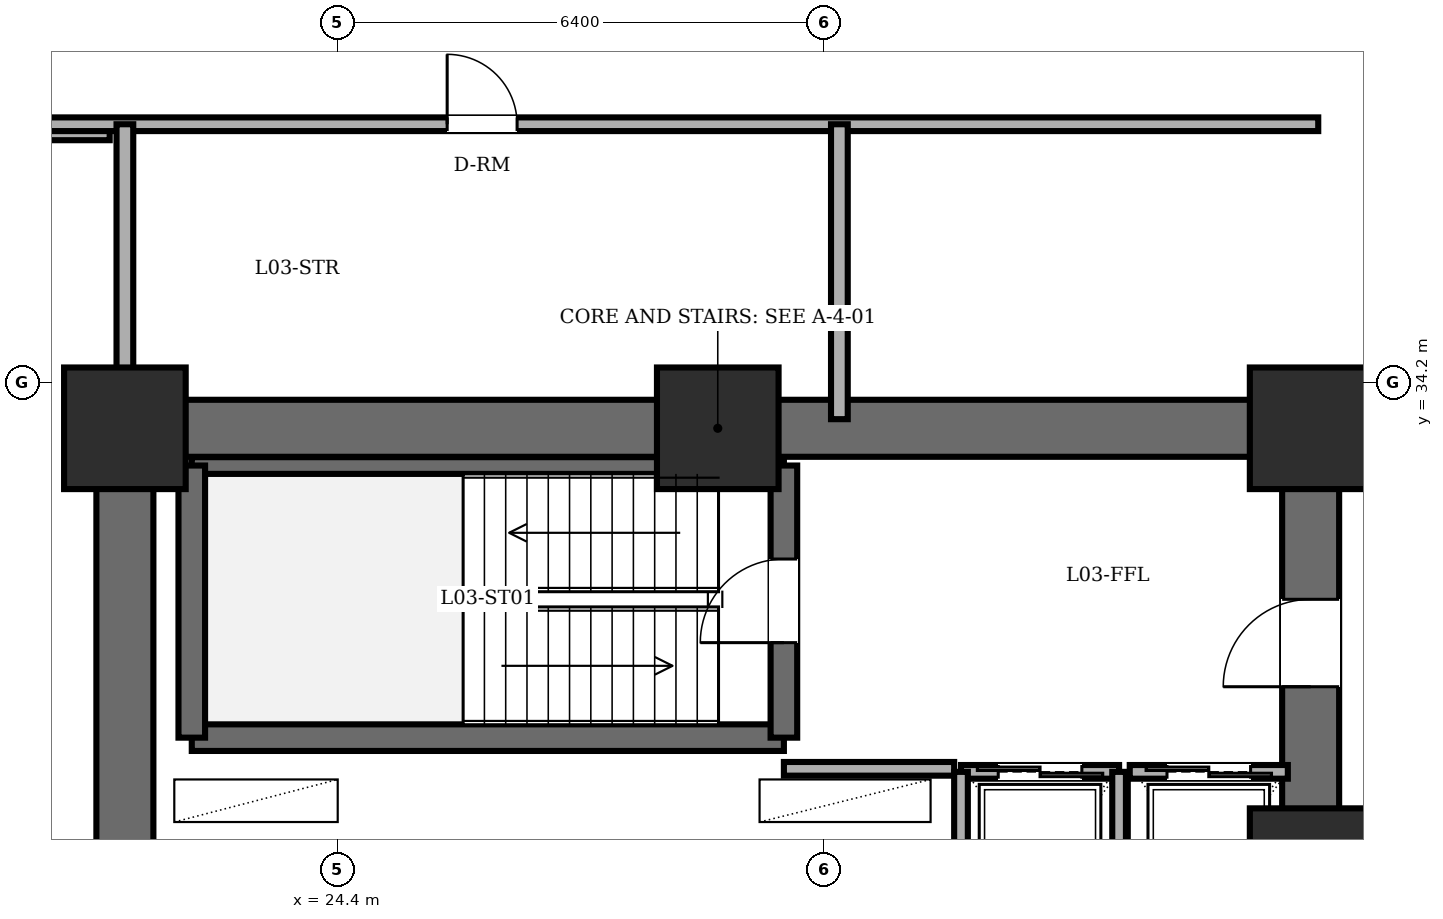
"""IFC4 building model, lengths in metres.
Left out: names, types, materials, properties, quantities, classifications, styles, units other than length and angle.
Written with IfcOpenShell. Run it as: python <this file> out.ifc"""

import sys

from ifc_helpers import new_model, si_unit, direction, frame, frame_2d, origin, origin_2d, place, context, subcontext, project, spatial, rectangle, extrude, element, fill, save


model = new_model("IFC4")
c1 = context("Model", 3, precision=1e-05, world=origin(), true_north=direction((0.0, 1.0)))
c2 = subcontext(c1, "Body", "Model", "MODEL_VIEW")
j1 = project(units=[si_unit("LENGTHUNIT", "METRE"), si_unit("PLANEANGLEUNIT", "RADIAN")], contexts=[c1])
p1 = place(None, origin())
s1 = spatial("IfcSite", under=j1, at=p1, CompositionType="ELEMENT")
p2 = place(p1, origin())
s2 = spatial("IfcBuilding", under=s1, at=p2, CompositionType="ELEMENT")
p3 = place(p2, frame((0.0, 0.0, 10.05)))
s3 = spatial("IfcBuildingStorey", under=s2, at=p3, CompositionType="ELEMENT", Elevation=10.05)
for number, where, z_axis, x_axis in (
    (1, (37.2, 27.8, 0.0), (0.0, 0.0, 1.0), (1.0, 0.0, 0.0)),
    (2, (37.2, 33.6, 0.0), (0.0, 0.0, 1.0), (1.0, 0.0, 0.0)),
    (3, (29.4, 33.6, 0.0), (0.0, 0.0, 1.0), (1.0, 0.0, 0.0)),
    (4, (21.6, 33.6, 0.0), (0.0, 0.0, 1.0), (1.0, 0.0, 0.0)),
):
    element("IfcColumn", number, at=place(p3, frame(where, z_axis=z_axis, x_axis=x_axis)), inside=s3, PredefinedType="COLUMN", context=c2, shape_type="SweptSolid", body=[
        extrude(rectangle(XDim=1.6, YDim=1.6, at=origin_2d()), origin(), (0.0, 0.0, 1.0), 4.65),
    ])
p4 = place(p3, frame((21.6, 14.4, 0.0), z_axis=(0.0, 0.0, 1.0), x_axis=(0.0, 1.0, 0.0)))
e5 = element("IfcWall", 5, at=p4, inside=s3, PredefinedType="SHEAR", context=c2, shape_type="SweptSolid", body=[
    extrude(rectangle(XDim=19.2, YDim=0.75, at=frame_2d((9.6, 0.0))), origin(), (0.0, 0.0, 1.0), 4.43),
])
p5 = place(p3, frame((21.6, 33.6, 0.0), z_axis=(0.0, 0.0, 1.0), x_axis=(1.0, 0.0, 0.0)))
e6 = element("IfcWall", 6, at=p5, inside=s3, PredefinedType="SHEAR", context=c2, shape_type="SweptSolid", body=[
    extrude(rectangle(XDim=15.6, YDim=0.75, at=frame_2d((7.8, 0.0))), origin(), (0.0, 0.0, 1.0), 4.43),
])
p6 = place(p3, frame((37.2, 14.4, 0.0), z_axis=(0.0, 0.0, 1.0), x_axis=(0.0, 1.0, 0.0)))
e7 = element("IfcWall", 7, at=p6, inside=s3, PredefinedType="SHEAR", context=c2, shape_type="SweptSolid", body=[
    extrude(rectangle(XDim=19.2, YDim=0.75, at=frame_2d((9.6, 0.0))), origin(), (0.0, 0.0, 1.0), 4.43),
])
p7 = place(p6, frame((15.8, 0.0, 0.0)))
e8 = element("IfcOpeningElement", 8, at=p7, cuts=e7, PredefinedType="OPENING", context=c2, shape_type="SweptSolid", body=[
    extrude(rectangle(XDim=1.15, YDim=2.15, at=frame_2d((0.575, 1.075))), frame((0.0, 0.385, 0.0), z_axis=(0.0, -1.0, 0.0), x_axis=(1.0, 0.0, 0.0)), (0.0, 0.0, 1.0), 0.77),
])
p8 = place(p6, frame((3.6, 0.0, 0.0)))
e9 = element("IfcOpeningElement", 9, at=p8, cuts=e7, PredefinedType="OPENING", context=c2, shape_type="SweptSolid", body=[
    extrude(rectangle(XDim=1.1, YDim=2.15, at=frame_2d((0.55, 1.075))), frame((0.0, 0.385, 0.0), z_axis=(0.0, -1.0, 0.0), x_axis=(1.0, 0.0, 0.0)), (0.0, 0.0, 1.0), 0.77),
])
p9 = place(p6, frame((8.6, 0.0, 0.0)))
e10 = element("IfcOpeningElement", 10, at=p9, cuts=e7, PredefinedType="OPENING", context=c2, shape_type="SweptSolid", body=[
    extrude(rectangle(XDim=1.3, YDim=2.2, at=frame_2d((0.65, 1.1))), frame((0.0, 0.385, 0.0), z_axis=(0.0, -1.0, 0.0), x_axis=(1.0, 0.0, 0.0)), (0.0, 0.0, 1.0), 0.77),
])
p10 = place(p3, frame((22.48, 29.53, 0.0), z_axis=(0.0, 0.0, 1.0), x_axis=(1.0, 0.0, 0.0)))
e11 = element("IfcWall", 11, at=p10, inside=s3, PredefinedType="SOLIDWALL", context=c2, shape_type="SweptSolid", body=[
    extrude(rectangle(XDim=7.79, YDim=0.35, at=frame_2d((3.895, 0.0))), origin(), (0.0, 0.0, 1.0), 4.43),
])
p11 = place(p3, frame((22.48, 33.11, 0.0), z_axis=(0.0, 0.0, 1.0), x_axis=(1.0, 0.0, 0.0)))
e12 = element("IfcWall", 12, at=p11, inside=s3, PredefinedType="PARTITIONING", context=c2, shape_type="SweptSolid", body=[
    extrude(rectangle(XDim=7.79, YDim=0.22, at=frame_2d((3.895, 0.0))), origin(), (0.0, 0.0, 1.0), 4.43),
])
p12 = place(p3, frame((22.48, 29.53, 0.0), z_axis=(0.0, 0.0, 1.0), x_axis=(0.0, 1.0, 0.0)))
e13 = element("IfcWall", 13, at=p12, inside=s3, PredefinedType="SOLIDWALL", context=c2, shape_type="SweptSolid", body=[
    extrude(rectangle(XDim=3.58, YDim=0.35, at=frame_2d((1.79, 0.0))), origin(), (0.0, 0.0, 1.0), 4.43),
])
p13 = place(p3, frame((30.27, 29.53, 0.0), z_axis=(0.0, 0.0, 1.0), x_axis=(0.0, 1.0, 0.0)))
e14 = element("IfcWall", 14, at=p13, inside=s3, PredefinedType="SOLIDWALL", context=c2, shape_type="SweptSolid", body=[
    extrude(rectangle(XDim=3.58, YDim=0.35, at=frame_2d((1.79, 0.0))), origin(), (0.0, 0.0, 1.0), 4.43),
])
p14 = place(p13, frame((1.25, 0.0, 0.0)))
e15 = element("IfcOpeningElement", 15, at=p14, cuts=e14, PredefinedType="OPENING", context=c2, shape_type="SweptSolid", body=[
    extrude(rectangle(XDim=1.1, YDim=2.15, at=frame_2d((0.55, 1.075))), frame((0.0, 0.185, 0.0), z_axis=(0.0, -1.0, 0.0), x_axis=(1.0, 0.0, 0.0)), (0.0, 0.0, 1.0), 0.37),
])
p15 = place(p3, frame((30.27, 29.12, 0.0), z_axis=(0.0, 0.0, 1.0), x_axis=(1.0, 0.0, 0.0)))
e16 = element("IfcWall", 16, at=p15, inside=s3, PredefinedType="PARTITIONING", context=c2, shape_type="SweptSolid", body=[
    extrude(rectangle(XDim=2.24, YDim=0.18, at=frame_2d((1.12, 0.0))), origin(), (0.0, 0.0, 1.0), 4.43),
])
p16 = place(p3, frame((32.6, 29.08, 0.0), z_axis=(0.0, 0.0, 1.0), x_axis=(1.0, 0.0, 0.0)))
e17 = element("IfcWall", 17, at=p16, inside=s3, PredefinedType="PARTITIONING", context=c2, shape_type="SweptSolid", body=[
    extrude(rectangle(XDim=2.08, YDim=0.18, at=frame_2d((1.04, 0.0))), origin(), (0.0, 0.0, 1.0), 4.43),
])
p17 = place(p16, frame((0.49, 0.0, 0.0)))
e18 = element("IfcOpeningElement", 18, at=p17, cuts=e17, PredefinedType="OPENING", context=c2, shape_type="SweptSolid", body=[
    extrude(rectangle(XDim=1.1, YDim=2.2, at=frame_2d((0.55, 1.1))), frame((0.0, 0.1, 0.0), z_axis=(0.0, -1.0, 0.0), x_axis=(1.0, 0.0, 0.0)), (0.0, 0.0, 1.0), 0.2),
])
for number, where, z_axis, x_axis in (
    (19, (34.68, 26.35, 0.0), (0.0, 0.0, 1.0), (0.0, 1.0, 0.0)),
    (20, (32.6, 29.08, 0.0), (0.0, 0.0, 1.0), (0.0, -1.0, 0.0)),
):
    element("IfcWall", number, at=place(p3, frame(where, z_axis=z_axis, x_axis=x_axis)), inside=s3, PredefinedType="PARTITIONING", context=c2, shape_type="SweptSolid", body=[
        extrude(rectangle(XDim=2.73, YDim=0.18, at=frame_2d((1.365, 0.0))), origin(), (0.0, 0.0, 1.0), 4.43),
    ])
p18 = place(p3, frame((34.82, 29.08, 0.0), z_axis=(0.0, 0.0, 1.0), x_axis=(1.0, 0.0, 0.0)))
e21 = element("IfcWall", 21, at=p18, inside=s3, PredefinedType="PARTITIONING", context=c2, shape_type="SweptSolid", body=[
    extrude(rectangle(XDim=2.08, YDim=0.18, at=frame_2d((1.04, 0.0))), origin(), (0.0, 0.0, 1.0), 4.43),
])
p19 = place(p18, frame((0.49, 0.0, 0.0)))
e22 = element("IfcOpeningElement", 22, at=p19, cuts=e21, PredefinedType="OPENING", context=c2, shape_type="SweptSolid", body=[
    extrude(rectangle(XDim=1.1, YDim=2.2, at=frame_2d((0.55, 1.1))), frame((0.0, 0.1, 0.0), z_axis=(0.0, -1.0, 0.0), x_axis=(1.0, 0.0, 0.0)), (0.0, 0.0, 1.0), 0.2),
])
p20 = place(p3, frame((1.6, 37.5, 0.0), z_axis=(0.0, 0.0, 1.0), x_axis=(1.0, 0.0, 0.0)))
e23 = element("IfcWall", 23, at=p20, inside=s3, PredefinedType="PARTITIONING", context=c2, shape_type="SweptSolid", body=[
    extrude(rectangle(XDim=19.8, YDim=0.22, at=frame_2d((9.9, 0.0))), origin(), (0.0, 0.0, 1.0), 4.43),
])
p21 = place(p3, frame((17.85, 37.6, 0.0), z_axis=(0.0, 0.0, 1.0), x_axis=(1.0, 0.0, 0.0)))
e24 = element("IfcWall", 24, at=p21, inside=s3, PredefinedType="PARTITIONING", context=c2, shape_type="SweptSolid", body=[
    extrude(rectangle(XDim=19.45, YDim=0.18, at=frame_2d((9.725, 0.0))), origin(), (0.0, 0.0, 1.0), 4.43),
])
p22 = place(p21, frame((7.99, 0.0, 0.0)))
e25 = element("IfcOpeningElement", 25, at=p22, cuts=e24, PredefinedType="OPENING", context=c2, shape_type="SweptSolid", body=[
    extrude(rectangle(XDim=0.92, YDim=2.1, at=frame_2d((0.46, 1.05))), frame((0.0, 0.1, 0.0), z_axis=(0.0, -1.0, 0.0), x_axis=(1.0, 0.0, 0.0)), (0.0, 0.0, 1.0), 0.2),
])
p23 = place(p3, frame((21.6, 33.72, 0.0), z_axis=(0.0, 0.0, 1.0), x_axis=(0.0, 1.0, 0.0)))
e26 = element("IfcWall", 26, at=p23, inside=s3, PredefinedType="PARTITIONING", context=c2, shape_type="SweptSolid", body=[
    extrude(rectangle(XDim=3.88, YDim=0.22, at=frame_2d((1.94, 0.0))), origin(), (0.0, 0.0, 1.0), 3.612),
])
p24 = place(p3, frame((31.0, 33.72, 0.0), z_axis=(0.0, 0.0, 1.0), x_axis=(0.0, 1.0, 0.0)))
e27 = element("IfcWall", 27, at=p24, inside=s3, PredefinedType="PARTITIONING", context=c2, shape_type="SweptSolid", body=[
    extrude(rectangle(XDim=3.88, YDim=0.22, at=frame_2d((1.94, 0.0))), origin(), (0.0, 0.0, 1.0), 4.43),
])
p25 = place(p14, origin())
e28 = element("IfcDoor", 28, at=p25, inside=s3, OperationType="SINGLE_SWING_LEFT", PredefinedType="DOOR", context=c2, shape_type="SweptSolid", body=[
    extrude(rectangle(XDim=1.1, YDim=2.15, at=frame_2d((0.55, 1.075))), frame((0.0, 0.025, 0.0), z_axis=(0.0, -1.0, 0.0), x_axis=(1.0, 0.0, 0.0)), (0.0, 0.0, 1.0), 0.05),
])
fill(e15, e28)
p26 = place(p7, origin())
e29 = element("IfcDoor", 29, at=p26, inside=s3, OperationType="SINGLE_SWING_LEFT", PredefinedType="DOOR", context=c2, shape_type="SweptSolid", body=[
    extrude(rectangle(XDim=1.15, YDim=2.15, at=frame_2d((0.575, 1.075))), frame((0.0, 0.025, 0.0), z_axis=(0.0, -1.0, 0.0), x_axis=(1.0, 0.0, 0.0)), (0.0, 0.0, 1.0), 0.05),
])
fill(e8, e29)
p27 = place(p17, origin())
e30 = element("IfcDoor", 30, at=p27, inside=s3, OperationType="DOUBLE_DOOR_SLIDING", PredefinedType="DOOR", context=c2, shape_type="SweptSolid", body=[
    extrude(rectangle(XDim=1.1, YDim=2.2, at=frame_2d((0.55, 1.1))), frame((0.0, 0.025, 0.0), z_axis=(0.0, -1.0, 0.0), x_axis=(1.0, 0.0, 0.0)), (0.0, 0.0, 1.0), 0.05),
])
fill(e18, e30)
p28 = place(p19, origin())
e31 = element("IfcDoor", 31, at=p28, inside=s3, OperationType="DOUBLE_DOOR_SLIDING", PredefinedType="DOOR", context=c2, shape_type="SweptSolid", body=[
    extrude(rectangle(XDim=1.1, YDim=2.2, at=frame_2d((0.55, 1.1))), frame((0.0, 0.025, 0.0), z_axis=(0.0, -1.0, 0.0), x_axis=(1.0, 0.0, 0.0)), (0.0, 0.0, 1.0), 0.05),
])
fill(e22, e31)
p29 = place(p22, origin())
e32 = element("IfcDoor", 32, at=p29, inside=s3, OperationType="SINGLE_SWING_LEFT", PredefinedType="DOOR", context=c2, shape_type="SweptSolid", body=[
    extrude(rectangle(XDim=0.92, YDim=2.1, at=frame_2d((0.46, 1.05))), frame((0.0, 0.025, 0.0), z_axis=(0.0, -1.0, 0.0), x_axis=(1.0, 0.0, 0.0)), (0.0, 0.0, 1.0), 0.05),
])
fill(e25, e32)
save(model, sys.argv[1])
